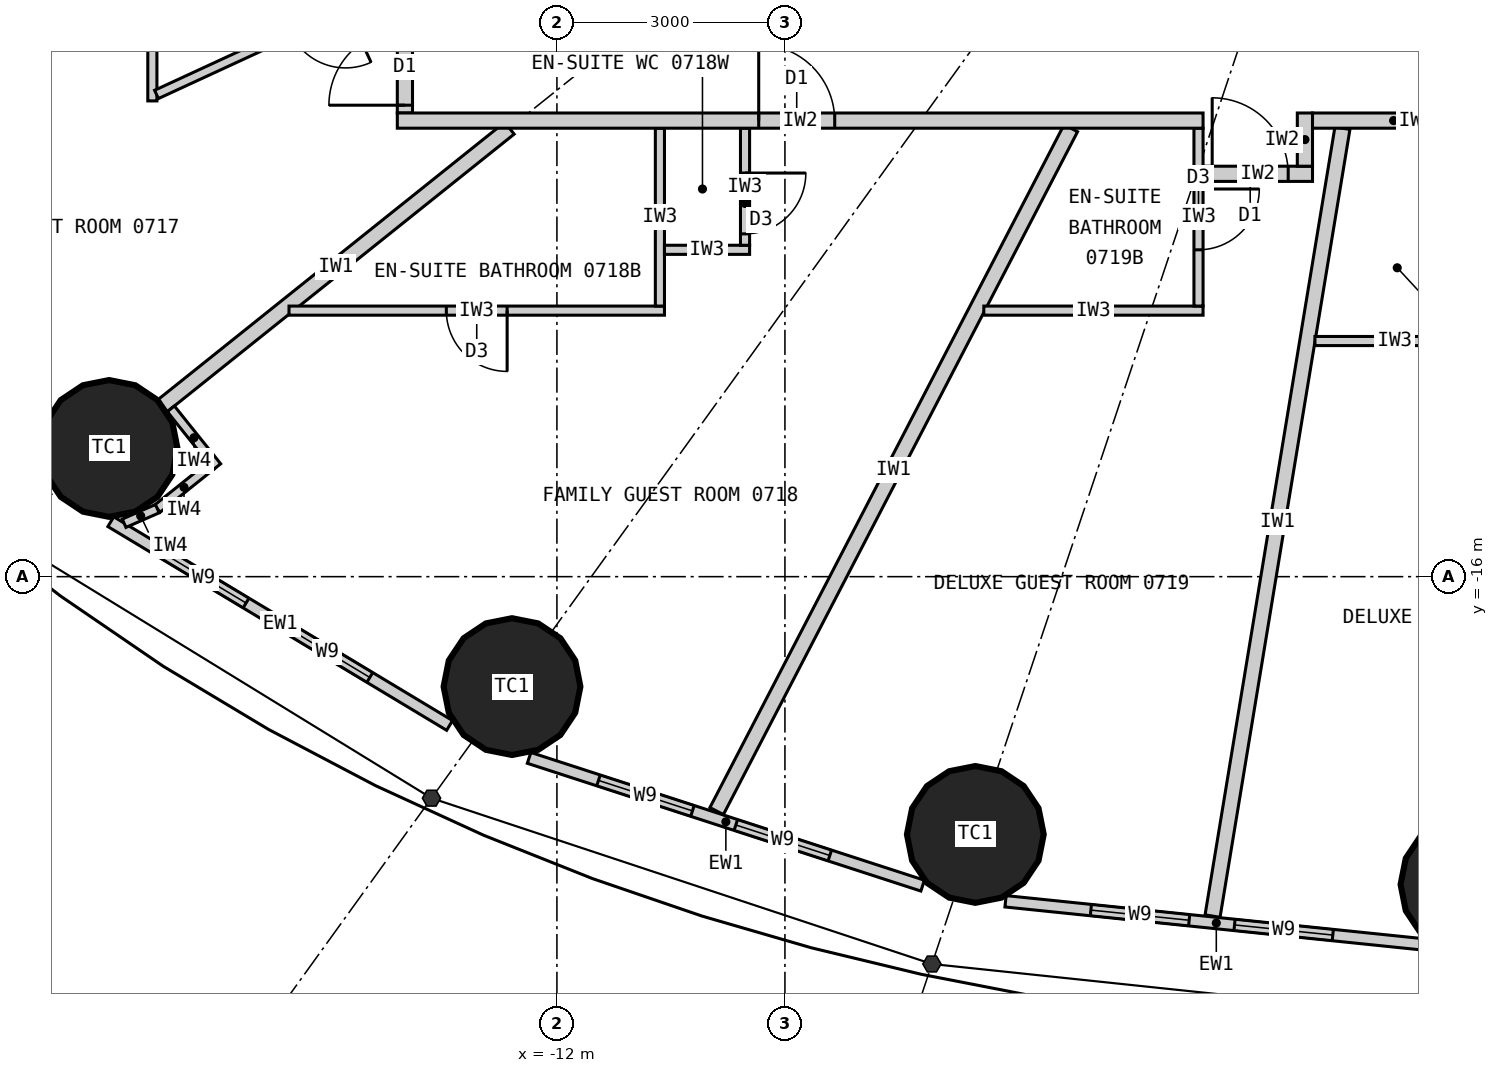
"""IFC4 building model, lengths in metres.
Left out: names, types, materials, properties, quantities, classifications, styles, units other than length and angle.
Written with IfcOpenShell. Run it as: python <this file> out.ifc"""

import sys

from ifc_helpers import new_model, si_unit, direction, frame, frame_2d, origin, origin_2d, place, context, subcontext, project, spatial, rectangle, circle, extrude, element, fill, save


model = new_model("IFC4")
c1 = context("Model", 3, precision=1e-05, world=origin(), true_north=direction((0.0, 1.0)))
c2 = subcontext(c1, "Body", "Model", "MODEL_VIEW")
j1 = project(units=[si_unit("LENGTHUNIT", "METRE"), si_unit("PLANEANGLEUNIT", "RADIAN")], contexts=[c1])
p1 = place(None, origin())
s1 = spatial("IfcSite", under=j1, at=p1, CompositionType="ELEMENT")
p2 = place(p1, origin())
s2 = spatial("IfcBuilding", under=s1, at=p2, CompositionType="ELEMENT")
p3 = place(p2, frame((0.0, 0.0, 36.0)))
s3 = spatial("IfcBuildingStorey", under=s2, at=p3, CompositionType="ELEMENT", Elevation=36.0)
for number, where, z_axis, x_axis in (
    (1, (-17.892, -14.313, 0.0), (0.0, 0.0, 1.0), (1.0, 0.0, 0.0)),
    (2, (-12.591, -17.447, 0.0), (0.0, 0.0, 1.0), (1.0, 0.0, 0.0)),
    (3, (-6.495, -19.391, 0.0), (0.0, 0.0, 1.0), (1.0, 0.0, 0.0)),
    (4, (0.0, -20.05, 0.0), (0.0, 0.0, 1.0), (1.0, 0.0, 0.0)),
):
    element("IfcColumn", number, at=place(p3, frame(where, z_axis=z_axis, x_axis=x_axis)), inside=s3, PredefinedType="COLUMN", context=c2, shape_type="SweptSolid", body=[
        extrude(circle(Radius=0.9, at=origin_2d()), origin(), (0.0, 0.0, 1.0), 3.3),
    ])
p4 = place(p3, frame((-17.869, -15.277, 0.0), z_axis=(0.0, 0.0, 1.0), x_axis=(0.856958191554, -0.515385931054, 0.0)))
e5 = element("IfcWall", 5, at=p4, inside=s3, PredefinedType="ELEMENTEDWALL", context=c2, shape_type="SweptSolid", body=[
    extrude(rectangle(XDim=5.201, YDim=0.15, at=frame_2d((2.601, 0.0))), origin(), (0.0, 0.0, 1.0), 3.12),
])
p5 = place(p4, frame((0.776, 0.0, 0.9)))
e6 = element("IfcOpeningElement", 6, at=p5, cuts=e5, PredefinedType="OPENING", context=c2, shape_type="SweptSolid", body=[
    extrude(rectangle(XDim=1.3, YDim=1.9, at=frame_2d((0.65, 0.95))), frame((0.0, 0.085, 0.0), z_axis=(0.0, -1.0, 0.0), x_axis=(1.0, 0.0, 0.0)), (0.0, 0.0, 1.0), 0.17),
])
p6 = place(p4, frame((2.676, 0.0, 0.9)))
e7 = element("IfcOpeningElement", 7, at=p6, cuts=e5, PredefinedType="OPENING", context=c2, shape_type="SweptSolid", body=[
    extrude(rectangle(XDim=1.3, YDim=1.9, at=frame_2d((0.65, 0.95))), frame((0.0, 0.085, 0.0), z_axis=(0.0, -1.0, 0.0), x_axis=(1.0, 0.0, 0.0)), (0.0, 0.0, 1.0), 0.17),
])
p7 = place(p3, frame((-12.366, -18.384, 0.0), z_axis=(0.0, 0.0, 1.0), x_axis=(0.951138486029, -0.308764603532, 0.0)))
e8 = element("IfcWall", 8, at=p7, inside=s3, PredefinedType="ELEMENTEDWALL", context=c2, shape_type="SweptSolid", body=[
    extrude(rectangle(XDim=5.444, YDim=0.15, at=frame_2d((2.722, 0.0))), origin(), (0.0, 0.0, 1.0), 3.12),
])
p8 = place(p7, frame((0.96, 0.0, 0.9)))
e9 = element("IfcOpeningElement", 9, at=p8, cuts=e8, PredefinedType="OPENING", context=c2, shape_type="SweptSolid", body=[
    extrude(rectangle(XDim=1.3, YDim=1.9, at=frame_2d((0.65, 0.95))), frame((0.0, 0.085, 0.0), z_axis=(0.0, -1.0, 0.0), x_axis=(1.0, 0.0, 0.0)), (0.0, 0.0, 1.0), 0.17),
])
p9 = place(p7, frame((2.86, 0.0, 0.9)))
e10 = element("IfcOpeningElement", 10, at=p9, cuts=e8, PredefinedType="OPENING", context=c2, shape_type="SweptSolid", body=[
    extrude(rectangle(XDim=1.3, YDim=1.9, at=frame_2d((0.65, 0.95))), frame((0.0, 0.085, 0.0), z_axis=(0.0, -1.0, 0.0), x_axis=(1.0, 0.0, 0.0)), (0.0, 0.0, 1.0), 0.17),
])
p10 = place(p3, frame((-6.098, -20.271, 0.0), z_axis=(0.0, 0.0, 1.0), x_axis=(0.994723735084, -0.102589915983, 0.0)))
e11 = element("IfcWall", 11, at=p10, inside=s3, PredefinedType="ELEMENTEDWALL", context=c2, shape_type="SweptSolid", body=[
    extrude(rectangle(XDim=5.576, YDim=0.15, at=frame_2d((2.788, 0.0))), origin(), (0.0, 0.0, 1.0), 3.12),
])
p11 = place(p10, frame((1.129, 0.0, 0.9)))
e12 = element("IfcOpeningElement", 12, at=p11, cuts=e11, PredefinedType="OPENING", context=c2, shape_type="SweptSolid", body=[
    extrude(rectangle(XDim=1.3, YDim=1.9, at=frame_2d((0.65, 0.95))), frame((0.0, 0.085, 0.0), z_axis=(0.0, -1.0, 0.0), x_axis=(1.0, 0.0, 0.0)), (0.0, 0.0, 1.0), 0.17),
])
p12 = place(p10, frame((3.029, 0.0, 0.9)))
e13 = element("IfcOpeningElement", 13, at=p12, cuts=e11, PredefinedType="OPENING", context=c2, shape_type="SweptSolid", body=[
    extrude(rectangle(XDim=1.3, YDim=1.9, at=frame_2d((0.65, 0.95))), frame((0.0, 0.085, 0.0), z_axis=(0.0, -1.0, 0.0), x_axis=(1.0, 0.0, 0.0)), (0.0, 0.0, 1.0), 0.17),
])
p13 = place(p3, frame((-14.1, -6.512, 0.0), z_axis=(0.0, 0.0, 1.0), x_axis=(-0.907842433118, -0.41931147925, 0.0)))
e14 = element("IfcWall", 14, at=p13, inside=s3, PredefinedType="PARTITIONING", context=c2, shape_type="SweptSolid", body=[
    extrude(rectangle(XDim=7.823, YDim=0.2, at=frame_2d((3.912, 0.0))), origin(), (0.0, 0.0, 1.0), 2.32),
])
p14 = place(p3, frame((-12.625, -10.1, 0.0), z_axis=(0.0, 0.0, 1.0), x_axis=(-0.780872884676, -0.624689953479, 0.0)))
e15 = element("IfcWall", 15, at=p14, inside=s3, PredefinedType="PARTITIONING", context=c2, shape_type="SweptSolid", body=[
    extrude(rectangle(XDim=5.845, YDim=0.2, at=frame_2d((2.922, 0.0))), origin(), (0.0, 0.0, 1.0), 2.32),
])
p15 = place(p3, frame((-5.239, -10.1, 0.0), z_axis=(0.0, 0.0, 1.0), x_axis=(-0.460422783389, -0.887699758103, 0.0)))
e16 = element("IfcWall", 16, at=p15, inside=s3, PredefinedType="PARTITIONING", context=c2, shape_type="SweptSolid", body=[
    extrude(rectangle(XDim=10.12, YDim=0.2, at=frame_2d((5.06, 0.0))), origin(), (0.0, 0.0, 1.0), 3.12),
])
p16 = place(p3, frame((-1.665, -10.1, 0.0), z_axis=(0.0, 0.0, 1.0), x_axis=(-0.162657606458, -0.986682574621, 0.0)))
e17 = element("IfcWall", 17, at=p16, inside=s3, PredefinedType="PARTITIONING", context=c2, shape_type="SweptSolid", body=[
    extrude(rectangle(XDim=10.505, YDim=0.2, at=frame_2d((5.252, 0.0))), origin(), (0.0, 0.0, 1.0), 3.12),
])
p17 = place(p3, frame((-17.323, -8.101, 0.0), z_axis=(0.0, 0.0, 1.0), x_axis=(0.0, -1.0, 0.0)))
e18 = element("IfcWall", 18, at=p17, inside=s3, PredefinedType="PARTITIONING", context=c2, shape_type="SweptSolid", body=[
    extrude(rectangle(XDim=1.64, YDim=0.12, at=frame_2d((0.82, 0.0))), origin(), (0.0, 0.0, 1.0), 3.12),
])
p18 = place(p3, frame((-14.1, -8.193, 0.0), z_axis=(0.0, 0.0, 1.0), x_axis=(-0.907836493557, -0.419324338628, 0.0)))
e19 = element("IfcWall", 19, at=p18, inside=s3, PredefinedType="PARTITIONING", context=c2, shape_type="SweptSolid", body=[
    extrude(rectangle(XDim=3.49, YDim=0.12, at=frame_2d((1.745, 0.0))), origin(), (0.0, 0.0, 1.0), 3.12),
])
p19 = place(p18, frame((0.75, 0.0, 0.0)))
e20 = element("IfcOpeningElement", 20, at=p19, cuts=e19, PredefinedType="OPENING", context=c2, shape_type="SweptSolid", body=[
    extrude(rectangle(XDim=0.8, YDim=2.1, at=frame_2d((0.4, 1.05))), frame((0.0, 0.07, 0.0), z_axis=(0.0, -1.0, 0.0), x_axis=(1.0, 0.0, 0.0)), (0.0, 0.0, 1.0), 0.14),
])
p20 = place(p3, frame((-15.525, -12.5, 0.0), z_axis=(0.0, 0.0, 1.0), x_axis=(1.0, 0.0, 0.0)))
e21 = element("IfcWall", 21, at=p20, inside=s3, PredefinedType="PARTITIONING", context=c2, shape_type="SweptSolid", body=[
    extrude(rectangle(XDim=4.94, YDim=0.12, at=frame_2d((2.47, 0.0))), origin(), (0.0, 0.0, 1.0), 3.12),
])
p21 = place(p20, frame((2.07, 0.0, 0.0)))
e22 = element("IfcOpeningElement", 22, at=p21, cuts=e21, PredefinedType="OPENING", context=c2, shape_type="SweptSolid", body=[
    extrude(rectangle(XDim=0.8, YDim=2.1, at=frame_2d((0.4, 1.05))), frame((0.0, 0.07, 0.0), z_axis=(0.0, -1.0, 0.0), x_axis=(1.0, 0.0, 0.0)), (0.0, 0.0, 1.0), 0.14),
])
p22 = place(p3, frame((-10.645, -10.1, 0.0), z_axis=(0.0, 0.0, 1.0), x_axis=(0.0, -1.0, 0.0)))
e23 = element("IfcWall", 23, at=p22, inside=s3, PredefinedType="PARTITIONING", context=c2, shape_type="SweptSolid", body=[
    extrude(rectangle(XDim=2.34, YDim=0.12, at=frame_2d((1.17, 0.0))), origin(), (0.0, 0.0, 1.0), 3.12),
])
p23 = place(p3, frame((-10.585, -11.7, 0.0), z_axis=(0.0, 0.0, 1.0), x_axis=(1.0, 0.0, 0.0)))
e24 = element("IfcWall", 24, at=p23, inside=s3, PredefinedType="PARTITIONING", context=c2, shape_type="SweptSolid", body=[
    extrude(rectangle(XDim=1.12, YDim=0.12, at=frame_2d((0.56, 0.0))), origin(), (0.0, 0.0, 1.0), 3.12),
])
p24 = place(p3, frame((-9.525, -10.1, 0.0), z_axis=(0.0, 0.0, 1.0), x_axis=(0.0, -1.0, 0.0)))
e25 = element("IfcWall", 25, at=p24, inside=s3, PredefinedType="PARTITIONING", context=c2, shape_type="SweptSolid", body=[
    extrude(rectangle(XDim=1.54, YDim=0.12, at=frame_2d((0.77, 0.0))), origin(), (0.0, 0.0, 1.0), 3.12),
])
p25 = place(p24, frame((0.59, 0.0, 0.0)))
e26 = element("IfcOpeningElement", 26, at=p25, cuts=e25, PredefinedType="OPENING", context=c2, shape_type="SweptSolid", body=[
    extrude(rectangle(XDim=0.8, YDim=2.1, at=frame_2d((0.4, 1.05))), frame((0.0, 0.07, 0.0), z_axis=(0.0, -1.0, 0.0), x_axis=(1.0, 0.0, 0.0)), (0.0, 0.0, 1.0), 0.14),
])
p26 = place(p3, frame((-6.383, -12.5, 0.0), z_axis=(0.0, 0.0, 1.0), x_axis=(1.0, 0.0, 0.0)))
e27 = element("IfcWall", 27, at=p26, inside=s3, PredefinedType="PARTITIONING", context=c2, shape_type="SweptSolid", body=[
    extrude(rectangle(XDim=2.885, YDim=0.12, at=frame_2d((1.442, 0.0))), origin(), (0.0, 0.0, 1.0), 3.12),
])
p27 = place(p3, frame((-3.559, -10.1, 0.0), z_axis=(0.0, 0.0, 1.0), x_axis=(0.0, -1.0, 0.0)))
e28 = element("IfcWall", 28, at=p27, inside=s3, PredefinedType="PARTITIONING", context=c2, shape_type="SweptSolid", body=[
    extrude(rectangle(XDim=2.34, YDim=0.12, at=frame_2d((1.17, 0.0))), origin(), (0.0, 0.0, 1.0), 3.12),
])
p28 = place(p27, frame((0.8, 0.0, 0.0)))
e29 = element("IfcOpeningElement", 29, at=p28, cuts=e28, PredefinedType="OPENING", context=c2, shape_type="SweptSolid", body=[
    extrude(rectangle(XDim=0.8, YDim=2.1, at=frame_2d((0.4, 1.05))), frame((0.0, 0.07, 0.0), z_axis=(0.0, -1.0, 0.0), x_axis=(1.0, 0.0, 0.0)), (0.0, 0.0, 1.0), 0.14),
])
p29 = place(p3, frame((-2.027, -12.9, 0.0), z_axis=(0.0, 0.0, 1.0), x_axis=(1.0, 0.0, 0.0)))
e30 = element("IfcWall", 30, at=p29, inside=s3, PredefinedType="PARTITIONING", context=c2, shape_type="SweptSolid", body=[
    extrude(rectangle(XDim=2.102, YDim=0.12, at=frame_2d((1.051, 0.0))), origin(), (0.0, 0.0, 1.0), 3.12),
])
p30 = place(p3, frame((-2.059, -10.7, 0.0), z_axis=(0.0, 0.0, 1.0), x_axis=(-1.0, 0.0, 0.0)))
e31 = element("IfcWall", 31, at=p30, inside=s3, PredefinedType="PARTITIONING", context=c2, shape_type="SweptSolid", body=[
    extrude(rectangle(XDim=1.44, YDim=0.2, at=frame_2d((0.72, 0.0))), origin(), (0.0, 0.0, 1.0), 3.12),
])
p31 = place(p30, frame((0.32, 0.0, 0.0)))
e32 = element("IfcOpeningElement", 32, at=p31, cuts=e31, PredefinedType="OPENING", context=c2, shape_type="SweptSolid", body=[
    extrude(rectangle(XDim=1.0, YDim=2.2, at=frame_2d((0.5, 1.1))), frame((0.0, 0.11, 0.0), z_axis=(0.0, -1.0, 0.0), x_axis=(1.0, 0.0, 0.0)), (0.0, 0.0, 1.0), 0.22),
])
p32 = place(p3, frame((-2.159, -9.9, 0.0), z_axis=(0.0, 0.0, 1.0), x_axis=(0.0, -1.0, 0.0)))
e33 = element("IfcWall", 33, at=p32, inside=s3, PredefinedType="PARTITIONING", context=c2, shape_type="SweptSolid", body=[
    extrude(rectangle(XDim=0.7, YDim=0.2, at=frame_2d((0.35, 0.0))), origin(), (0.0, 0.0, 1.0), 3.12),
])
p33 = place(p3, frame((-14.0, -4.772, 0.0), z_axis=(0.0, 0.0, 1.0), x_axis=(0.0, -1.0, 0.0)))
e34 = element("IfcWall", 34, at=p33, inside=s3, PredefinedType="PARTITIONING", context=c2, shape_type="SweptSolid", body=[
    extrude(rectangle(XDim=5.127, YDim=0.2, at=frame_2d((2.564, 0.0))), origin(), (0.0, 0.0, 1.0), 3.12),
])
p34 = place(p33, frame((4.025, 0.0, 0.0)))
e35 = element("IfcOpeningElement", 35, at=p34, cuts=e34, PredefinedType="OPENING", context=c2, shape_type="SweptSolid", body=[
    extrude(rectangle(XDim=1.0, YDim=2.2, at=frame_2d((0.5, 1.1))), frame((0.0, 0.11, 0.0), z_axis=(0.0, -1.0, 0.0), x_axis=(1.0, 0.0, 0.0)), (0.0, 0.0, 1.0), 0.22),
])
p35 = place(p3, frame((0.075, -10.0, 0.0), z_axis=(0.0, 0.0, 1.0), x_axis=(-1.0, 0.0, 0.0)))
e36 = element("IfcWall", 36, at=p35, inside=s3, PredefinedType="PARTITIONING", context=c2, shape_type="SweptSolid", body=[
    extrude(rectangle(XDim=2.134, YDim=0.2, at=frame_2d((1.067, 0.0))), origin(), (0.0, 0.0, 1.0), 3.12),
])
p36 = place(p3, frame((-3.499, -10.0, 0.0), z_axis=(0.0, 0.0, 1.0), x_axis=(-1.0, 0.0, 0.0)))
e37 = element("IfcWall", 37, at=p36, inside=s3, PredefinedType="PARTITIONING", context=c2, shape_type="SweptSolid", body=[
    extrude(rectangle(XDim=10.602, YDim=0.2, at=frame_2d((5.301, 0.0))), origin(), (0.0, 0.0, 1.0), 3.12),
])
p37 = place(p36, frame((4.846, 0.0, 0.0)))
e38 = element("IfcOpeningElement", 38, at=p37, cuts=e37, PredefinedType="OPENING", context=c2, shape_type="SweptSolid", body=[
    extrude(rectangle(XDim=1.0, YDim=2.2, at=frame_2d((0.5, 1.1))), frame((0.0, 0.11, 0.0), z_axis=(0.0, -1.0, 0.0), x_axis=(1.0, 0.0, 0.0)), (0.0, 0.0, 1.0), 0.22),
])
p38 = place(p3, frame((-17.08, -13.792, 0.0), z_axis=(0.0, 0.0, 1.0), x_axis=(0.624756144097, -0.780819928289, 0.0)))
e39 = element("IfcWall", 39, at=p38, inside=s3, PredefinedType="PARTITIONING", context=c2, shape_type="SweptSolid", body=[
    extrude(rectangle(XDim=0.975, YDim=0.12, at=frame_2d((0.487, 0.0))), origin(), (0.0, 0.0, 1.0), 3.12),
])
p39 = place(p3, frame((-16.555, -14.543, 0.0), z_axis=(0.0, 0.0, 1.0), x_axis=(-0.780789399477, -0.62479429708, 0.0)))
e40 = element("IfcWall", 40, at=p39, inside=s3, PredefinedType="PARTITIONING", context=c2, shape_type="SweptSolid", body=[
    extrude(rectangle(XDim=0.9, YDim=0.12, at=frame_2d((0.45, 0.0))), origin(), (0.0, 0.0, 1.0), 3.12),
])
p40 = place(p3, frame((-17.258, -15.106, 0.0), z_axis=(0.0, 0.0, 1.0), x_axis=(-0.916098562583, -0.400953143937, 0.0)))
e41 = element("IfcWall", 41, at=p40, inside=s3, PredefinedType="PARTITIONING", context=c2, shape_type="SweptSolid", body=[
    extrude(rectangle(XDim=0.477, YDim=0.12, at=frame_2d((0.238, 0.0))), origin(), (0.0, 0.0, 1.0), 3.12),
])
p41 = place(p5, origin())
e42 = element("IfcWindow", 42, at=p41, inside=s3, PartitioningType="SINGLE_PANEL", PredefinedType="WINDOW", context=c2, shape_type="SweptSolid", body=[
    extrude(rectangle(XDim=1.3, YDim=1.9, at=frame_2d((0.65, 0.95))), frame((0.0, 0.03, 0.0), z_axis=(0.0, -1.0, 0.0), x_axis=(1.0, 0.0, 0.0)), (0.0, 0.0, 1.0), 0.06),
])
fill(e6, e42)
p42 = place(p6, origin())
e43 = element("IfcWindow", 43, at=p42, inside=s3, PartitioningType="SINGLE_PANEL", PredefinedType="WINDOW", context=c2, shape_type="SweptSolid", body=[
    extrude(rectangle(XDim=1.3, YDim=1.9, at=frame_2d((0.65, 0.95))), frame((0.0, 0.03, 0.0), z_axis=(0.0, -1.0, 0.0), x_axis=(1.0, 0.0, 0.0)), (0.0, 0.0, 1.0), 0.06),
])
fill(e7, e43)
p43 = place(p8, origin())
e44 = element("IfcWindow", 44, at=p43, inside=s3, PartitioningType="SINGLE_PANEL", PredefinedType="WINDOW", context=c2, shape_type="SweptSolid", body=[
    extrude(rectangle(XDim=1.3, YDim=1.9, at=frame_2d((0.65, 0.95))), frame((0.0, 0.03, 0.0), z_axis=(0.0, -1.0, 0.0), x_axis=(1.0, 0.0, 0.0)), (0.0, 0.0, 1.0), 0.06),
])
fill(e9, e44)
p44 = place(p9, origin())
e45 = element("IfcWindow", 45, at=p44, inside=s3, PartitioningType="SINGLE_PANEL", PredefinedType="WINDOW", context=c2, shape_type="SweptSolid", body=[
    extrude(rectangle(XDim=1.3, YDim=1.9, at=frame_2d((0.65, 0.95))), frame((0.0, 0.03, 0.0), z_axis=(0.0, -1.0, 0.0), x_axis=(1.0, 0.0, 0.0)), (0.0, 0.0, 1.0), 0.06),
])
fill(e10, e45)
p45 = place(p11, origin())
e46 = element("IfcWindow", 46, at=p45, inside=s3, PartitioningType="SINGLE_PANEL", PredefinedType="WINDOW", context=c2, shape_type="SweptSolid", body=[
    extrude(rectangle(XDim=1.3, YDim=1.9, at=frame_2d((0.65, 0.95))), frame((0.0, 0.03, 0.0), z_axis=(0.0, -1.0, 0.0), x_axis=(1.0, 0.0, 0.0)), (0.0, 0.0, 1.0), 0.06),
])
fill(e12, e46)
p46 = place(p12, origin())
e47 = element("IfcWindow", 47, at=p46, inside=s3, PartitioningType="SINGLE_PANEL", PredefinedType="WINDOW", context=c2, shape_type="SweptSolid", body=[
    extrude(rectangle(XDim=1.3, YDim=1.9, at=frame_2d((0.65, 0.95))), frame((0.0, 0.03, 0.0), z_axis=(0.0, -1.0, 0.0), x_axis=(1.0, 0.0, 0.0)), (0.0, 0.0, 1.0), 0.06),
])
fill(e13, e47)
p47 = place(p34, origin())
e48 = element("IfcDoor", 48, at=p47, inside=s3, OperationType="SINGLE_SWING_RIGHT", PredefinedType="DOOR", context=c2, shape_type="SweptSolid", body=[
    extrude(rectangle(XDim=1.0, YDim=2.2, at=frame_2d((0.5, 1.1))), frame((0.0, 0.025, 0.0), z_axis=(0.0, -1.0, 0.0), x_axis=(1.0, 0.0, 0.0)), (0.0, 0.0, 1.0), 0.05),
])
fill(e35, e48)
p48 = place(p21, origin())
e49 = element("IfcDoor", 49, at=p48, inside=s3, OperationType="SINGLE_SWING_RIGHT", PredefinedType="DOOR", context=c2, shape_type="SweptSolid", body=[
    extrude(rectangle(XDim=0.8, YDim=2.1, at=frame_2d((0.4, 1.05))), frame((0.0, 0.025, 0.0), z_axis=(0.0, -1.0, 0.0), x_axis=(1.0, 0.0, 0.0)), (0.0, 0.0, 1.0), 0.05),
])
fill(e22, e49)
p49 = place(p25, origin())
e50 = element("IfcDoor", 50, at=p49, inside=s3, OperationType="SINGLE_SWING_LEFT", PredefinedType="DOOR", context=c2, shape_type="SweptSolid", body=[
    extrude(rectangle(XDim=0.8, YDim=2.1, at=frame_2d((0.4, 1.05))), frame((0.0, 0.025, 0.0), z_axis=(0.0, -1.0, 0.0), x_axis=(1.0, 0.0, 0.0)), (0.0, 0.0, 1.0), 0.05),
])
fill(e26, e50)
p50 = place(p37, origin())
e51 = element("IfcDoor", 51, at=p50, inside=s3, OperationType="SINGLE_SWING_RIGHT", PredefinedType="DOOR", context=c2, shape_type="SweptSolid", body=[
    extrude(rectangle(XDim=1.0, YDim=2.2, at=frame_2d((0.5, 1.1))), frame((0.0, 0.025, 0.0), z_axis=(0.0, -1.0, 0.0), x_axis=(1.0, 0.0, 0.0)), (0.0, 0.0, 1.0), 0.05),
])
fill(e38, e51)
p51 = place(p28, origin())
e52 = element("IfcDoor", 52, at=p51, inside=s3, OperationType="SINGLE_SWING_LEFT", PredefinedType="DOOR", context=c2, shape_type="SweptSolid", body=[
    extrude(rectangle(XDim=0.8, YDim=2.1, at=frame_2d((0.4, 1.05))), frame((0.0, 0.025, 0.0), z_axis=(0.0, -1.0, 0.0), x_axis=(1.0, 0.0, 0.0)), (0.0, 0.0, 1.0), 0.05),
])
fill(e29, e52)
p52 = place(p31, origin())
e53 = element("IfcDoor", 53, at=p52, inside=s3, OperationType="SINGLE_SWING_RIGHT", PredefinedType="DOOR", context=c2, shape_type="SweptSolid", body=[
    extrude(rectangle(XDim=1.0, YDim=2.2, at=frame_2d((0.5, 1.1))), frame((0.0, 0.025, 0.0), z_axis=(0.0, -1.0, 0.0), x_axis=(1.0, 0.0, 0.0)), (0.0, 0.0, 1.0), 0.05),
])
fill(e32, e53)
save(model, sys.argv[1])
